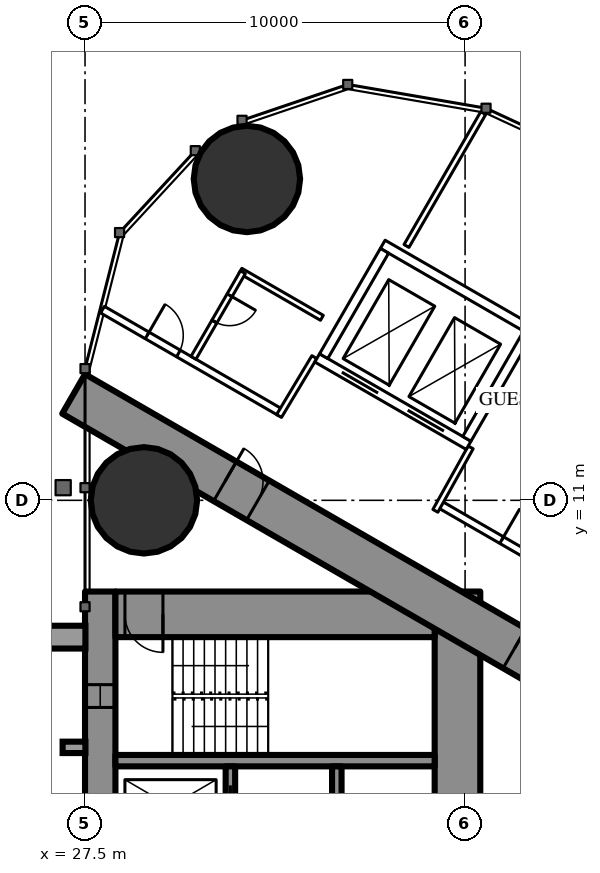
"""IFC4 building model, lengths in metres.
Left out: names, types, materials, properties, quantities, classifications, styles, units other than length and angle.
Written with IfcOpenShell. Run it as: python <this file> out.ifc"""

import sys

from ifc_helpers import new_model, si_unit, direction, frame, frame_2d, origin, origin_2d, place, context, subcontext, project, spatial, rectangle, circle, extrude, element, fill, save


model = new_model("IFC4")
c1 = context("Model", 3, precision=1e-05, world=origin(), true_north=direction((0.0, 1.0)))
c2 = subcontext(c1, "Body", "Model", "MODEL_VIEW")
j1 = project(units=[si_unit("LENGTHUNIT", "METRE"), si_unit("PLANEANGLEUNIT", "RADIAN")], contexts=[c1])
p1 = place(None, origin())
s1 = spatial("IfcSite", under=j1, at=p1, CompositionType="ELEMENT")
p2 = place(p1, origin())
s2 = spatial("IfcBuilding", under=s1, at=p2, CompositionType="ELEMENT")
p3 = place(p2, frame((0.0, 0.0, 156.3)))
s3 = spatial("IfcBuildingStorey", under=s2, at=p3, CompositionType="ELEMENT", Elevation=156.3)
for number, where, z_axis, x_axis in (
    (1, (31.76, 19.456, 0.0), (0.0, 0.0, 1.0), (1.0, 0.0, 0.0)),
    (2, (29.05, 11.0, 0.0), (0.0, 0.0, 1.0), (1.0, 0.0, 0.0)),
):
    element("IfcColumn", number, at=place(p3, frame(where, z_axis=z_axis, x_axis=x_axis)), inside=s3, PredefinedType="COLUMN", context=c2, shape_type="SweptSolid", body=[
        extrude(circle(Radius=1.4, at=origin_2d()), origin(), (0.0, 0.0, 1.0), 3.5),
    ])
p4 = place(p3, frame((27.9, -8.6, 0.0), z_axis=(0.0, 0.0, 1.0), x_axis=(0.0, 1.0, 0.0)))
e3 = element("IfcWall", 3, at=p4, inside=s3, PredefinedType="SHEAR", context=c2, shape_type="SweptSolid", body=[
    extrude(rectangle(XDim=17.2, YDim=0.8, at=frame_2d((8.6, 0.0))), origin(), (0.0, 0.0, 1.0), 3.5),
])
p5 = place(p4, frame((2.45, 0.0, 0.6)))
e4 = element("IfcOpeningElement", 4, at=p5, cuts=e3, PredefinedType="OPENING", context=c2, shape_type="SweptSolid", body=[
    extrude(rectangle(XDim=0.6, YDim=2.1, at=frame_2d((0.3, 1.05))), frame((0.0, 0.41, 0.0), z_axis=(0.0, -1.0, 0.0), x_axis=(1.0, 0.0, 0.0)), (0.0, 0.0, 1.0), 0.82),
])
p6 = place(p4, frame((14.15, 0.0, 0.6)))
e5 = element("IfcOpeningElement", 5, at=p6, cuts=e3, PredefinedType="OPENING", context=c2, shape_type="SweptSolid", body=[
    extrude(rectangle(XDim=0.6, YDim=2.1, at=frame_2d((0.3, 1.05))), frame((0.0, 0.41, 0.0), z_axis=(0.0, -1.0, 0.0), x_axis=(1.0, 0.0, 0.0)), (0.0, 0.0, 1.0), 0.82),
])
p7 = place(p3, frame((37.3, -8.6, 0.0), z_axis=(0.0, 0.0, 1.0), x_axis=(0.0, 1.0, 0.0)))
e6 = element("IfcWall", 6, at=p7, inside=s3, PredefinedType="SHEAR", context=c2, shape_type="SweptSolid", body=[
    extrude(rectangle(XDim=17.2, YDim=1.2, at=frame_2d((8.6, 0.0))), origin(), (0.0, 0.0, 1.0), 3.5),
])
p8 = place(p7, frame((7.7, 0.0, 0.0)))
e7 = element("IfcOpeningElement", 7, at=p8, cuts=e6, PredefinedType="OPENING", context=c2, shape_type="SweptSolid", body=[
    extrude(rectangle(XDim=1.8, YDim=2.2, at=frame_2d((0.9, 1.1))), frame((0.0, 0.61, 0.0), z_axis=(0.0, -1.0, 0.0), x_axis=(1.0, 0.0, 0.0)), (0.0, 0.0, 1.0), 1.22),
])
p9 = place(p3, frame((28.3, 8.0, 0.0), z_axis=(0.0, 0.0, 1.0), x_axis=(1.0, 0.0, 0.0)))
e8 = element("IfcWall", 8, at=p9, inside=s3, PredefinedType="SHEAR", context=c2, shape_type="SweptSolid", body=[
    extrude(rectangle(XDim=8.4, YDim=1.2, at=frame_2d((4.2, 0.0))), origin(), (0.0, 0.0, 1.0), 3.5),
])
p10 = place(p9, frame((0.25, 0.0, 0.0)))
e9 = element("IfcOpeningElement", 9, at=p10, cuts=e8, PredefinedType="OPENING", context=c2, shape_type="SweptSolid", body=[
    extrude(rectangle(XDim=1.0, YDim=2.2, at=frame_2d((0.5, 1.1))), frame((0.0, 0.61, 0.0), z_axis=(0.0, -1.0, 0.0), x_axis=(1.0, 0.0, 0.0)), (0.0, 0.0, 1.0), 1.22),
])
p11 = place(p3, frame((28.3, 4.15, 0.0), z_axis=(0.0, 0.0, 1.0), x_axis=(1.0, 0.0, 0.0)))
e10 = element("IfcWall", 10, at=p11, inside=s3, PredefinedType="SHEAR", context=c2, shape_type="SweptSolid", body=[
    extrude(rectangle(XDim=8.4, YDim=0.3, at=frame_2d((4.2, 0.0))), origin(), (0.0, 0.0, 1.0), 3.5),
])
p12 = place(p3, frame((31.325, 1.9, 0.0), z_axis=(0.0, 0.0, 1.0), x_axis=(0.0, 1.0, 0.0)))
e11 = element("IfcWall", 11, at=p12, inside=s3, PredefinedType="SHEAR", context=c2, shape_type="SweptSolid", body=[
    extrude(rectangle(XDim=2.1, YDim=0.25, at=frame_2d((1.05, 0.0))), origin(), (0.0, 0.0, 1.0), 3.5),
])
p13 = place(p12, frame((0.5, 0.0, 0.0)))
e12 = element("IfcOpeningElement", 12, at=p13, cuts=e11, PredefinedType="OPENING", context=c2, shape_type="SweptSolid", body=[
    extrude(rectangle(XDim=1.1, YDim=2.2, at=frame_2d((0.55, 1.1))), frame((0.0, 0.135, 0.0), z_axis=(0.0, -1.0, 0.0), x_axis=(1.0, 0.0, 0.0)), (0.0, 0.0, 1.0), 0.27),
])
p14 = place(p3, frame((34.125, 1.65, 0.0), z_axis=(0.0, 0.0, 1.0), x_axis=(0.0, 1.0, 0.0)))
e13 = element("IfcWall", 13, at=p14, inside=s3, PredefinedType="SHEAR", context=c2, shape_type="SweptSolid", body=[
    extrude(rectangle(XDim=2.35, YDim=0.25, at=frame_2d((1.175, 0.0))), origin(), (0.0, 0.0, 1.0), 3.5),
])
p15 = place(p3, frame((27.2, 13.8, 0.0), z_axis=(0.0, 0.0, 1.0), x_axis=(0.866024515034, -0.500001539357, 0.0)))
e14 = element("IfcWall", 14, at=p15, inside=s3, PredefinedType="SHEAR", context=c2, shape_type="SweptSolid", body=[
    extrude(rectangle(XDim=26.907, YDim=1.2, at=frame_2d((13.454, 0.0))), origin(), (0.0, 0.0, 1.0), 3.5),
])
p16 = place(p15, frame((4.6, 0.0, 0.0)))
e15 = element("IfcOpeningElement", 15, at=p16, cuts=e14, PredefinedType="OPENING", context=c2, shape_type="SweptSolid", body=[
    extrude(rectangle(XDim=1.0, YDim=2.2, at=frame_2d((0.5, 1.1))), frame((0.0, 0.61, 0.0), z_axis=(0.0, -1.0, 0.0), x_axis=(1.0, 0.0, 0.0)), (0.0, 0.0, 1.0), 1.22),
])
p17 = place(p15, frame((13.395, 0.0, 0.0)))
e16 = element("IfcOpeningElement", 16, at=p17, cuts=e14, PredefinedType="OPENING", context=c2, shape_type="SweptSolid", body=[
    extrude(rectangle(XDim=1.8, YDim=2.2, at=frame_2d((0.9, 1.1))), frame((0.0, 0.61, 0.0), z_axis=(0.0, -1.0, 0.0), x_axis=(1.0, 0.0, 0.0)), (0.0, 0.0, 1.0), 1.22),
])
p18 = place(p3, frame((35.959, 17.692, 0.0), z_axis=(0.0, 0.0, 1.0), x_axis=(0.499991298838, 0.866030427344, 0.0)))
e17 = element("IfcWall", 17, at=p18, inside=s3, PredefinedType="PARTITIONING", context=c2, shape_type="SweptSolid", body=[
    extrude(rectangle(XDim=4.035, YDim=0.15, at=frame_2d((2.018, 0.0))), origin(), (0.0, 0.0, 1.0), 3.25),
])
p19 = place(p3, frame((27.959, 16.017, 0.0), z_axis=(0.0, 0.0, 1.0), x_axis=(0.866028444157, -0.499994733882, 0.0)))
e18 = element("IfcWall", 18, at=p19, inside=s3, PredefinedType="PARTITIONING", context=c2, shape_type="SweptSolid", body=[
    extrude(rectangle(XDim=5.407, YDim=0.2, at=frame_2d((2.704, 0.0))), origin(), (0.0, 0.0, 1.0), 3.25),
])
p20 = place(p19, frame((1.357, 0.0, 0.0)))
e19 = element("IfcOpeningElement", 19, at=p20, cuts=e18, PredefinedType="OPENING", context=c2, shape_type="SweptSolid", body=[
    extrude(rectangle(XDim=0.95, YDim=2.2, at=frame_2d((0.475, 1.1))), frame((0.0, 0.11, 0.0), z_axis=(0.0, -1.0, 0.0), x_axis=(1.0, 0.0, 0.0)), (0.0, 0.0, 1.0), 0.22),
])
p21 = place(p3, frame((36.834, 10.894, 0.0), z_axis=(0.0, 0.0, 1.0), x_axis=(0.866031655879, -0.499989170898, 0.0)))
e20 = element("IfcWall", 20, at=p21, inside=s3, PredefinedType="PARTITIONING", context=c2, shape_type="SweptSolid", body=[
    extrude(rectangle(XDim=11.41, YDim=0.2, at=frame_2d((5.705, 0.0))), origin(), (0.0, 0.0, 1.0), 3.25),
])
p22 = place(p21, frame((4.861, 0.0, 0.0)))
e21 = element("IfcOpeningElement", 21, at=p22, cuts=e20, PredefinedType="OPENING", context=c2, shape_type="SweptSolid", body=[
    extrude(rectangle(XDim=0.95, YDim=2.2, at=frame_2d((0.475, 1.1))), frame((0.0, 0.11, 0.0), z_axis=(0.0, -1.0, 0.0), x_axis=(1.0, 0.0, 0.0)), (0.0, 0.0, 1.0), 0.22),
])
p23 = place(p21, frame((1.881, 0.0, 0.0)))
e22 = element("IfcOpeningElement", 22, at=p23, cuts=e20, PredefinedType="OPENING", context=c2, shape_type="SweptSolid", body=[
    extrude(rectangle(XDim=0.95, YDim=2.2, at=frame_2d((0.475, 1.1))), frame((0.0, 0.11, 0.0), z_axis=(0.0, -1.0, 0.0), x_axis=(1.0, 0.0, 0.0)), (0.0, 0.0, 1.0), 0.22),
])
p24 = place(p21, frame((9.102, 0.0, 0.0)))
e23 = element("IfcOpeningElement", 23, at=p24, cuts=e20, PredefinedType="OPENING", context=c2, shape_type="SweptSolid", body=[
    extrude(rectangle(XDim=1.8, YDim=2.2, at=frame_2d((0.9, 1.1))), frame((0.0, 0.11, 0.0), z_axis=(0.0, -1.0, 0.0), x_axis=(1.0, 0.0, 0.0)), (0.0, 0.0, 1.0), 0.22),
])
p25 = place(p3, frame((36.719, 10.723, 0.0), z_axis=(0.0, 0.0, 1.0), x_axis=(0.486348184724, 0.87376509613, 0.0)))
e24 = element("IfcWall", 24, at=p25, inside=s3, PredefinedType="PARTITIONING", context=c2, shape_type="SweptSolid", body=[
    extrude(rectangle(XDim=1.91, YDim=0.15, at=frame_2d((0.955, 0.0))), origin(), (0.0, 0.0, 1.0), 3.25),
])
p26 = place(p3, frame((33.533, 14.767, 0.0), z_axis=(0.0, 0.0, 1.0), x_axis=(-0.514296815006, -0.857612258585, 0.0)))
e25 = element("IfcWall", 25, at=p26, inside=s3, PredefinedType="PARTITIONING", context=c2, shape_type="SweptSolid", body=[
    extrude(rectangle(XDim=1.805, YDim=0.15, at=frame_2d((0.902, 0.0))), origin(), (0.0, 0.0, 1.0), 3.25),
])
p27 = place(p3, frame((31.589, 17.04, 0.0), z_axis=(0.0, 0.0, 1.0), x_axis=(0.866006523861, -0.500032699561, 0.0)))
e26 = element("IfcWall", 26, at=p27, inside=s3, PredefinedType="PARTITIONING", context=c2, shape_type="SweptSolid", body=[
    extrude(rectangle(XDim=2.475, YDim=0.15, at=frame_2d((1.237, 0.0))), origin(), (0.0, 0.0, 1.0), 3.25),
])
p28 = place(p3, frame((30.904, 15.703, 0.0), z_axis=(0.0, 0.0, 1.0), x_axis=(0.499990139034, 0.866031096941, 0.0)))
e27 = element("IfcWall", 27, at=p28, inside=s3, PredefinedType="PARTITIONING", context=c2, shape_type="SweptSolid", body=[
    extrude(rectangle(XDim=1.5, YDim=0.15, at=frame_2d((0.75, 0.0))), origin(), (0.0, 0.0, 1.0), 3.25),
])
p29 = place(p28, origin())
e28 = element("IfcOpeningElement", 28, at=p29, cuts=e27, PredefinedType="OPENING", context=c2, shape_type="SweptSolid", body=[
    extrude(rectangle(XDim=0.8, YDim=2.2, at=frame_2d((0.4, 1.1))), frame((0.0, 0.085, 0.0), z_axis=(0.0, -1.0, 0.0), x_axis=(1.0, 0.0, 0.0)), (0.0, 0.0, 1.0), 0.17),
])
p30 = place(p3, frame((33.608, 14.747, 0.0), z_axis=(0.0, 0.0, 1.0), x_axis=(0.866043305498, -0.49996899204, 0.0)))
e29 = element("IfcWall", 29, at=p30, inside=s3, PredefinedType="PARTITIONING", context=c2, shape_type="SweptSolid", body=[
    extrude(rectangle(XDim=4.6, YDim=0.25, at=frame_2d((2.3, 0.0))), origin(), (0.0, 0.0, 1.0), 3.25),
])
p31 = place(p30, frame((0.75, 0.0, 0.0)))
e30 = element("IfcOpeningElement", 30, at=p31, cuts=e29, PredefinedType="OPENING", context=c2, shape_type="SweptSolid", body=[
    extrude(rectangle(XDim=1.1, YDim=2.2, at=frame_2d((0.55, 1.1))), frame((0.0, 0.135, 0.0), z_axis=(0.0, -1.0, 0.0), x_axis=(1.0, 0.0, 0.0)), (0.0, 0.0, 1.0), 0.27),
])
p32 = place(p30, frame((2.75, 0.0, 0.0)))
e31 = element("IfcOpeningElement", 31, at=p32, cuts=e29, PredefinedType="OPENING", context=c2, shape_type="SweptSolid", body=[
    extrude(rectangle(XDim=1.1, YDim=2.2, at=frame_2d((0.55, 1.1))), frame((0.0, 0.135, 0.0), z_axis=(0.0, -1.0, 0.0), x_axis=(1.0, 0.0, 0.0)), (0.0, 0.0, 1.0), 0.27),
])
p33 = place(p3, frame((35.333, 17.736, 0.0), z_axis=(0.0, 0.0, 1.0), x_axis=(0.866043305498, -0.49996899204, 0.0)))
e32 = element("IfcWall", 32, at=p33, inside=s3, PredefinedType="PARTITIONING", context=c2, shape_type="SweptSolid", body=[
    extrude(rectangle(XDim=4.6, YDim=0.25, at=frame_2d((2.3, 0.0))), origin(), (0.0, 0.0, 1.0), 3.25),
])
for number, where, z_axis, x_axis in (
    (33, (33.779, 14.793, 0.0), (0.0, 0.0, 1.0), (0.5, 0.866, 0.0)),
    (34, (37.547, 12.618, 0.0), (0.0, 0.0, 1.0), (0.5, 0.866, 0.0)),
):
    element("IfcWall", number, at=place(p3, frame(where, z_axis=z_axis, x_axis=x_axis)), inside=s3, PredefinedType="PARTITIONING", context=c2, shape_type="SweptSolid", body=[
        extrude(rectangle(XDim=3.201, YDim=0.25, at=frame_2d((1.6, 0.0))), origin(), (0.0, 0.0, 1.0), 3.25),
    ])
p34 = place(p3, frame((30.354, 14.75, 0.0), z_axis=(0.0, 0.0, 1.0), x_axis=(0.50002983664, 0.866008176907, 0.0)))
e35 = element("IfcWall", 35, at=p34, inside=s3, PredefinedType="PARTITIONING", context=c2, shape_type="SweptSolid", body=[
    extrude(rectangle(XDim=1.1, YDim=0.15, at=frame_2d((0.55, 0.0))), origin(), (0.0, 0.0, 1.0), 1.95),
])
p35 = place(p23, origin())
e36 = element("IfcDoor", 36, at=p35, inside=s3, OperationType="SINGLE_SWING_LEFT", PredefinedType="DOOR", context=c2, shape_type="SweptSolid", body=[
    extrude(rectangle(XDim=0.95, YDim=2.2, at=frame_2d((0.475, 1.1))), frame((0.0, 0.025, 0.0), z_axis=(0.0, -1.0, 0.0), x_axis=(1.0, 0.0, 0.0)), (0.0, 0.0, 1.0), 0.05),
])
fill(e22, e36)
p36 = place(p29, origin())
e37 = element("IfcDoor", 37, at=p36, inside=s3, OperationType="SINGLE_SWING_RIGHT", PredefinedType="DOOR", context=c2, shape_type="SweptSolid", body=[
    extrude(rectangle(XDim=0.8, YDim=2.2, at=frame_2d((0.4, 1.1))), frame((0.0, 0.025, 0.0), z_axis=(0.0, -1.0, 0.0), x_axis=(1.0, 0.0, 0.0)), (0.0, 0.0, 1.0), 0.05),
])
fill(e28, e37)
p37 = place(p20, origin())
e38 = element("IfcDoor", 38, at=p37, inside=s3, OperationType="SINGLE_SWING_LEFT", PredefinedType="DOOR", context=c2, shape_type="SweptSolid", body=[
    extrude(rectangle(XDim=0.95, YDim=2.2, at=frame_2d((0.475, 1.1))), frame((0.0, 0.025, 0.0), z_axis=(0.0, -1.0, 0.0), x_axis=(1.0, 0.0, 0.0)), (0.0, 0.0, 1.0), 0.05),
])
fill(e19, e38)
p38 = place(p16, origin())
e39 = element("IfcDoor", 39, at=p38, inside=s3, OperationType="SINGLE_SWING_LEFT", PredefinedType="DOOR", context=c2, shape_type="SweptSolid", body=[
    extrude(rectangle(XDim=1.0, YDim=2.2, at=frame_2d((0.5, 1.1))), frame((0.0, 0.025, 0.0), z_axis=(0.0, -1.0, 0.0), x_axis=(1.0, 0.0, 0.0)), (0.0, 0.0, 1.0), 0.05),
])
fill(e15, e39)
p39 = place(p17, origin())
e40 = element("IfcDoor", 40, at=p39, inside=s3, OperationType="DOUBLE_DOOR_SINGLE_SWING", PredefinedType="DOOR", context=c2, shape_type="SweptSolid", body=[
    extrude(rectangle(XDim=1.8, YDim=2.2, at=frame_2d((0.9, 1.1))), frame((0.0, 0.025, 0.0), z_axis=(0.0, -1.0, 0.0), x_axis=(1.0, 0.0, 0.0)), (0.0, 0.0, 1.0), 0.05),
])
fill(e16, e40)
p40 = place(p10, origin())
e41 = element("IfcDoor", 41, at=p40, inside=s3, OperationType="SINGLE_SWING_RIGHT", PredefinedType="DOOR", context=c2, shape_type="SweptSolid", body=[
    extrude(rectangle(XDim=1.0, YDim=2.2, at=frame_2d((0.5, 1.1))), frame((0.0, 0.025, 0.0), z_axis=(0.0, -1.0, 0.0), x_axis=(1.0, 0.0, 0.0)), (0.0, 0.0, 1.0), 0.05),
])
fill(e9, e41)
p41 = place(p13, origin())
e42 = element("IfcDoor", 42, at=p41, inside=s3, OperationType="SLIDING_TO_LEFT", PredefinedType="USERDEFINED", context=c2, shape_type="SweptSolid", body=[
    extrude(rectangle(XDim=1.1, YDim=2.2, at=frame_2d((0.55, 1.1))), frame((0.0, 0.025, 0.0), z_axis=(0.0, -1.0, 0.0), x_axis=(1.0, 0.0, 0.0)), (0.0, 0.0, 1.0), 0.05),
])
fill(e12, e42)
p42 = place(p31, origin())
e43 = element("IfcDoor", 43, at=p42, inside=s3, OperationType="DOUBLE_DOOR_SLIDING", PredefinedType="USERDEFINED", context=c2, shape_type="SweptSolid", body=[
    extrude(rectangle(XDim=1.1, YDim=2.2, at=frame_2d((0.55, 1.1))), frame((0.0, 0.025, 0.0), z_axis=(0.0, -1.0, 0.0), x_axis=(1.0, 0.0, 0.0)), (0.0, 0.0, 1.0), 0.05),
])
fill(e30, e43)
p43 = place(p32, origin())
e44 = element("IfcDoor", 44, at=p43, inside=s3, OperationType="DOUBLE_DOOR_SLIDING", PredefinedType="USERDEFINED", context=c2, shape_type="SweptSolid", body=[
    extrude(rectangle(XDim=1.1, YDim=2.2, at=frame_2d((0.55, 1.1))), frame((0.0, 0.025, 0.0), z_axis=(0.0, -1.0, 0.0), x_axis=(1.0, 0.0, 0.0)), (0.0, 0.0, 1.0), 0.05),
])
fill(e31, e44)
p44 = place(p6, origin())
e45 = element("IfcWindow", 45, at=p44, inside=s3, PartitioningType="SINGLE_PANEL", PredefinedType="WINDOW", context=c2, shape_type="SweptSolid", body=[
    extrude(rectangle(XDim=0.6, YDim=2.1, at=frame_2d((0.3, 1.05))), frame((0.0, 0.03, 0.0), z_axis=(0.0, -1.0, 0.0), x_axis=(1.0, 0.0, 0.0)), (0.0, 0.0, 1.0), 0.06),
])
fill(e5, e45)
save(model, sys.argv[1])
